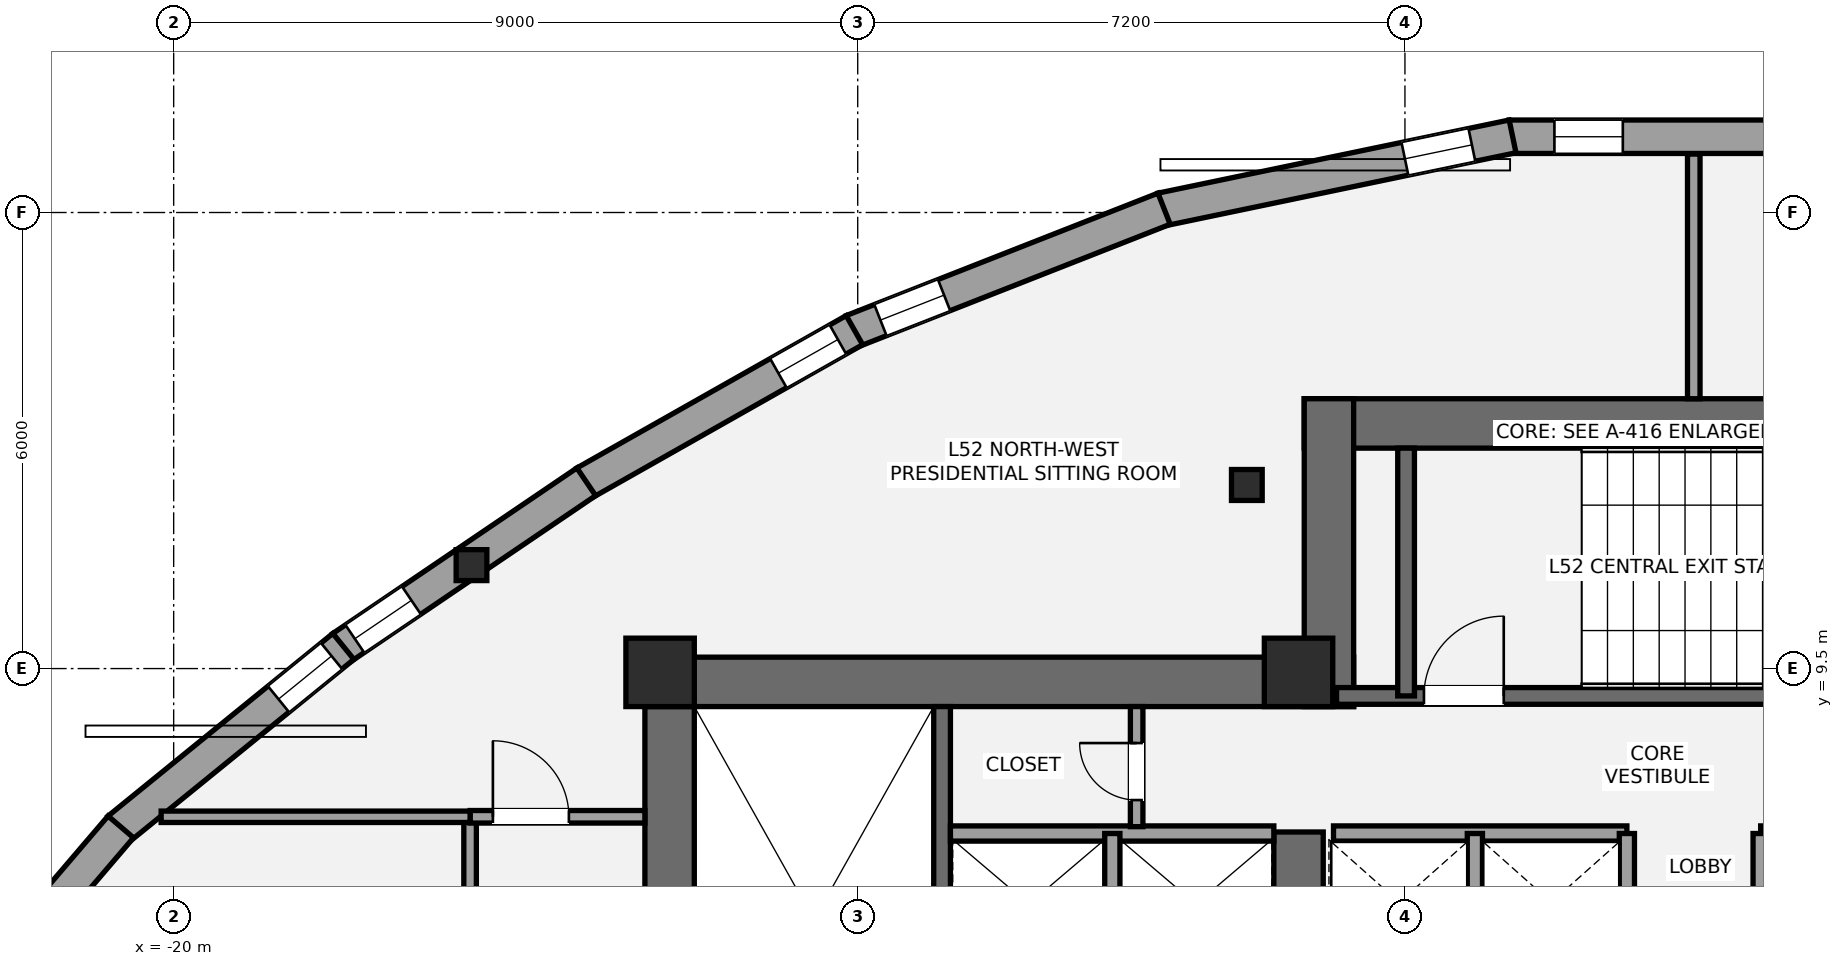
"""IFC4 building model, lengths in metres.
Left out: names, types, materials, properties, quantities, classifications, styles, units other than length and angle.
Written with IfcOpenShell. Run it as: python <this file> out.ifc"""

import sys

from ifc_helpers import new_model, si_unit, direction, frame, frame_2d, origin, origin_2d, place, context, subcontext, project, spatial, rectangle, i_section, extrude, element, fill, save


model = new_model("IFC4")
c1 = context("Model", 3, precision=1e-05, world=origin(), true_north=direction((0.0, 1.0)))
c2 = subcontext(c1, "Body", "Model", "MODEL_VIEW")
j1 = project(units=[si_unit("LENGTHUNIT", "METRE"), si_unit("PLANEANGLEUNIT", "RADIAN")], contexts=[c1])
p1 = place(None, origin())
s1 = spatial("IfcSite", under=j1, at=p1, CompositionType="ELEMENT")
p2 = place(p1, origin())
s2 = spatial("IfcBuilding", under=s1, at=p2, CompositionType="ELEMENT")
p3 = place(p2, frame((0.0, 0.0, 188.6)))
s3 = spatial("IfcBuildingStorey", under=s2, at=p3, CompositionType="ELEMENT", Elevation=188.6)
p4 = place(p3, frame((-13.475, 1.2, 0.0), z_axis=(0.0, 0.0, 1.0), x_axis=(0.0, 1.0, 0.0)))
e1 = element("IfcWall", 1, at=p4, inside=s3, PredefinedType="SHEAR", context=c2, shape_type="SweptSolid", body=[
    extrude(rectangle(XDim=8.45, YDim=0.65, at=frame_2d((4.225, 0.0))), origin(), (0.0, 0.0, 1.0), 3.2),
])
p5 = place(p3, frame((-13.8, 9.325, 0.0), z_axis=(0.0, 0.0, 1.0), x_axis=(1.0, 0.0, 0.0)))
e2 = element("IfcWall", 2, at=p5, inside=s3, PredefinedType="SHEAR", context=c2, shape_type="SweptSolid", body=[
    extrude(rectangle(XDim=9.325, YDim=0.65, at=frame_2d((4.663, 0.0))), origin(), (0.0, 0.0, 1.0), 3.2),
])
p6 = place(p3, frame((-5.2, 5.35, 0.0), z_axis=(0.0, 0.0, 1.0), x_axis=(0.0, 1.0, 0.0)))
e3 = element("IfcWall", 3, at=p6, inside=s3, PredefinedType="SHEAR", context=c2, shape_type="SweptSolid", body=[
    extrude(rectangle(XDim=2.0, YDim=0.65, at=frame_2d((1.0, 0.0))), origin(), (0.0, 0.0, 1.0), 3.2),
])
p7 = place(p3, frame((-9.89, 1.85, 0.0), z_axis=(0.0, 0.0, 1.0), x_axis=(0.0, 1.0, 0.0)))
e4 = element("IfcWall", 4, at=p7, inside=s3, PredefinedType="SHEAR", context=c2, shape_type="SweptSolid", body=[
    extrude(rectangle(XDim=7.15, YDim=0.22, at=frame_2d((3.575, 0.0))), origin(), (0.0, 0.0, 1.0), 3.2),
])
p8 = place(p3, frame((-5.125, 12.725, 0.0), z_axis=(0.0, 0.0, 1.0), x_axis=(1.0, 0.0, 0.0)))
e5 = element("IfcWall", 5, at=p8, inside=s3, PredefinedType="SHEAR", context=c2, shape_type="SweptSolid", body=[
    extrude(rectangle(XDim=10.25, YDim=0.65, at=frame_2d((5.125, 0.0))), origin(), (0.0, 0.0, 1.0), 3.2),
])
p9 = place(p3, frame((-4.8, 9.0, 0.0), z_axis=(0.0, 0.0, 1.0), x_axis=(0.0, 1.0, 0.0)))
e6 = element("IfcWall", 6, at=p9, inside=s3, PredefinedType="SHEAR", context=c2, shape_type="SweptSolid", body=[
    extrude(rectangle(XDim=4.05, YDim=0.65, at=frame_2d((2.025, 0.0))), origin(), (0.0, 0.0, 1.0), 3.2),
])
p10 = place(p3, frame((-4.7, 9.14, 0.0), z_axis=(0.0, 0.0, 1.0), x_axis=(1.0, 0.0, 0.0)))
e7 = element("IfcWall", 7, at=p10, inside=s3, PredefinedType="SHEAR", context=c2, shape_type="SweptSolid", body=[
    extrude(rectangle(XDim=9.3, YDim=0.22, at=frame_2d((4.65, 0.0))), origin(), (0.0, 0.0, 1.0), 3.2),
])
p11 = place(p10, frame((1.15, 0.0, 0.0)))
e8 = element("IfcOpeningElement", 8, at=p11, cuts=e7, PredefinedType="OPENING", context=c2, shape_type="SweptSolid", body=[
    extrude(rectangle(XDim=1.05, YDim=2.15, at=frame_2d((0.525, 1.075))), frame((0.0, 0.12, 0.0), z_axis=(0.0, -1.0, 0.0), x_axis=(1.0, 0.0, 0.0)), (0.0, 0.0, 1.0), 0.24),
])
p12 = place(p3, frame((-3.785, 9.14, 0.0), z_axis=(0.0, 0.0, 1.0), x_axis=(0.0, 1.0, 0.0)))
e9 = element("IfcWall", 9, at=p12, inside=s3, PredefinedType="SHEAR", context=c2, shape_type="SweptSolid", body=[
    extrude(rectangle(XDim=3.26, YDim=0.22, at=frame_2d((1.63, 0.0))), origin(), (0.0, 0.0, 1.0), 3.2),
])
for number, where, z_axis, x_axis in (
    (10, (-13.6, 9.45, 0.0), (0.0, 0.0, 1.0), (1.0, 0.0, 0.0)),
    (11, (-5.2, 9.45, 0.0), (0.0, 0.0, 1.0), (1.0, 0.0, 0.0)),
):
    element("IfcColumn", number, at=place(p3, frame(where, z_axis=z_axis, x_axis=x_axis)), inside=s3, PredefinedType="COLUMN", context=c2, shape_type="SweptSolid", body=[
        extrude(rectangle(XDim=0.9, YDim=0.9, at=origin_2d()), origin(), (0.0, 0.0, 1.0), 3.2),
    ])
for number, where, z_axis, x_axis in (
    (12, (-5.88, 11.915, 0.0), (0.0, 0.0, 1.0), (1.0, 0.0, 0.0)),
    (13, (-16.082, 10.861, 0.0), (0.0, 0.0, 1.0), (1.0, 0.0, 0.0)),
):
    element("IfcColumn", number, at=place(p3, frame(where, z_axis=z_axis, x_axis=x_axis)), inside=s3, PredefinedType="COLUMN", context=c2, shape_type="SweptSolid", body=[
        extrude(i_section(OverallWidth=0.404, OverallDepth=0.407, WebThickness=0.027, FlangeThickness=0.044, at=origin_2d()), origin(), (0.0, 0.0, 1.0), 3.2),
    ])
p13 = place(p3, frame((-2.429, 16.497, 0.0), z_axis=(0.0, 0.0, 1.0), x_axis=(1.0, 0.0, 0.0)))
e14 = element("IfcWall", 14, at=p13, inside=s3, PredefinedType="STANDARD", context=c2, shape_type="SweptSolid", body=[
    extrude(rectangle(XDim=4.857, YDim=0.44, at=frame_2d((2.429, 0.0))), origin(), (0.0, 0.0, 1.0), 2.315),
])
p14 = place(p13, frame((0.595, 0.0, 0.58)))
e15 = element("IfcOpeningElement", 15, at=p14, cuts=e14, PredefinedType="OPENING", context=c2, shape_type="SweptSolid", body=[
    extrude(rectangle(XDim=0.9, YDim=1.35, at=frame_2d((0.45, 0.675))), frame((0.0, 0.23, 0.0), z_axis=(0.0, -1.0, 0.0), x_axis=(1.0, 0.0, 0.0)), (0.0, 0.0, 1.0), 0.46),
])
p15 = place(p3, frame((-7.005, 15.539, 0.0), z_axis=(0.0, 0.0, 1.0), x_axis=(0.979004509935, 0.203838586943, 0.0)))
e16 = element("IfcWall", 16, at=p15, inside=s3, PredefinedType="STANDARD", context=c2, shape_type="SweptSolid", body=[
    extrude(rectangle(XDim=4.72, YDim=0.44, at=frame_2d((2.36, 0.0))), origin(), (0.0, 0.0, 1.0), 2.315),
])
p16 = place(p15, frame((3.273, 0.0, 0.58)))
e17 = element("IfcOpeningElement", 17, at=p16, cuts=e16, PredefinedType="OPENING", context=c2, shape_type="SweptSolid", body=[
    extrude(rectangle(XDim=0.9, YDim=1.35, at=frame_2d((0.45, 0.675))), frame((0.0, 0.23, 0.0), z_axis=(0.0, -1.0, 0.0), x_axis=(1.0, 0.0, 0.0)), (0.0, 0.0, 1.0), 0.46),
])
p17 = place(p3, frame((-11.071, 13.939, 0.0), z_axis=(0.0, 0.0, 1.0), x_axis=(0.930777752543, 0.365585524018, 0.0)))
e18 = element("IfcWall", 18, at=p17, inside=s3, PredefinedType="STANDARD", context=c2, shape_type="SweptSolid", body=[
    extrude(rectangle(XDim=4.407, YDim=0.44, at=frame_2d((2.203, 0.0))), origin(), (0.0, 0.0, 1.0), 2.315),
])
p18 = place(p17, frame((0.397, 0.0, 0.58)))
e19 = element("IfcOpeningElement", 19, at=p18, cuts=e18, PredefinedType="OPENING", context=c2, shape_type="SweptSolid", body=[
    extrude(rectangle(XDim=0.9, YDim=1.35, at=frame_2d((0.45, 0.675))), frame((0.0, 0.23, 0.0), z_axis=(0.0, -1.0, 0.0), x_axis=(1.0, 0.0, 0.0)), (0.0, 0.0, 1.0), 0.46),
])
p19 = place(p3, frame((-14.587, 11.948, 0.0), z_axis=(0.0, 0.0, 1.0), x_axis=(0.870346086449, 0.492440544434, 0.0)))
e20 = element("IfcWall", 20, at=p19, inside=s3, PredefinedType="STANDARD", context=c2, shape_type="SweptSolid", body=[
    extrude(rectangle(XDim=4.071, YDim=0.44, at=frame_2d((2.036, 0.0))), origin(), (0.0, 0.0, 1.0), 2.315),
])
p20 = place(p19, frame((2.922, 0.0, 0.58)))
e21 = element("IfcOpeningElement", 21, at=p20, cuts=e20, PredefinedType="OPENING", context=c2, shape_type="SweptSolid", body=[
    extrude(rectangle(XDim=0.9, YDim=1.35, at=frame_2d((0.45, 0.675))), frame((0.0, 0.23, 0.0), z_axis=(0.0, -1.0, 0.0), x_axis=(1.0, 0.0, 0.0)), (0.0, 0.0, 1.0), 0.46),
])
p21 = place(p3, frame((-17.782, 9.78, 0.0), z_axis=(0.0, 0.0, 1.0), x_axis=(0.82772633423, 0.56113199483, 0.0)))
e22 = element("IfcWall", 22, at=p21, inside=s3, PredefinedType="STANDARD", context=c2, shape_type="SweptSolid", body=[
    extrude(rectangle(XDim=3.879, YDim=0.44, at=frame_2d((1.939, 0.0))), origin(), (0.0, 0.0, 1.0), 2.315),
])
p22 = place(p21, frame((0.2, 0.0, 0.58)))
e23 = element("IfcOpeningElement", 23, at=p22, cuts=e22, PredefinedType="OPENING", context=c2, shape_type="SweptSolid", body=[
    extrude(rectangle(XDim=0.9, YDim=1.35, at=frame_2d((0.45, 0.675))), frame((0.0, 0.23, 0.0), z_axis=(0.0, -1.0, 0.0), x_axis=(1.0, 0.0, 0.0)), (0.0, 0.0, 1.0), 0.46),
])
p23 = place(p3, frame((-20.724, 7.389, 0.0), z_axis=(0.0, 0.0, 1.0), x_axis=(0.776145361002, 0.63055402512, 0.0)))
e24 = element("IfcWall", 24, at=p23, inside=s3, PredefinedType="STANDARD", context=c2, shape_type="SweptSolid", body=[
    extrude(rectangle(XDim=3.81, YDim=0.44, at=frame_2d((1.905, 0.0))), origin(), (0.0, 0.0, 1.0), 2.315),
])
p24 = place(p23, frame((2.71, 0.0, 0.42)))
e25 = element("IfcOpeningElement", 25, at=p24, cuts=e24, PredefinedType="OPENING", context=c2, shape_type="SweptSolid", body=[
    extrude(rectangle(XDim=0.9, YDim=1.35, at=frame_2d((0.45, 0.675))), frame((0.0, 0.23, 0.0), z_axis=(0.0, -1.0, 0.0), x_axis=(1.0, 0.0, 0.0)), (0.0, 0.0, 1.0), 0.46),
])
p25 = place(p3, frame((-23.072, 4.636, 0.0), z_axis=(0.0, 0.0, 1.0), x_axis=(0.649641806751, 0.760240437573, 0.0)))
e26 = element("IfcWall", 26, at=p25, inside=s3, PredefinedType="STANDARD", context=c2, shape_type="SweptSolid", body=[
    extrude(rectangle(XDim=3.658, YDim=0.44, at=frame_2d((1.829, 0.0))), origin(), (0.0, 0.0, 1.0), 2.315),
])
p26 = place(p25, frame((0.2, 0.0, 0.42)))
e27 = element("IfcOpeningElement", 27, at=p26, cuts=e26, PredefinedType="OPENING", context=c2, shape_type="SweptSolid", body=[
    extrude(rectangle(XDim=0.9, YDim=1.35, at=frame_2d((0.45, 0.675))), frame((0.0, 0.23, 0.0), z_axis=(0.0, -1.0, 0.0), x_axis=(1.0, 0.0, 0.0)), (0.0, 0.0, 1.0), 0.46),
])
p27 = place(p3, frame((-9.78, 7.33, 0.0), z_axis=(0.0, 0.0, 1.0), x_axis=(1.0, 0.0, 0.0)))
e28 = element("IfcWall", 28, at=p27, inside=s3, PredefinedType="SOLIDWALL", context=c2, shape_type="SweptSolid", body=[
    extrude(rectangle(XDim=4.255, YDim=0.2, at=frame_2d((2.127, 0.0))), origin(), (0.0, 0.0, 1.0), 3.02),
])
p28 = place(p3, frame((-7.65, 5.47, 0.0), z_axis=(0.0, 0.0, 1.0), x_axis=(0.0, 1.0, 0.0)))
e29 = element("IfcWall", 29, at=p28, inside=s3, PredefinedType="SOLIDWALL", context=c2, shape_type="SweptSolid", body=[
    extrude(rectangle(XDim=1.86, YDim=0.2, at=frame_2d((0.93, 0.0))), origin(), (0.0, 0.0, 1.0), 3.02),
])
for number, where, z_axis, x_axis in (
    (30, (-4.74, 7.33, 0.0), (0.0, 0.0, 1.0), (1.0, 0.0, 0.0)),
    (31, (0.88, 7.33, 0.0), (0.0, 0.0, 1.0), (1.0, 0.0, 0.0)),
):
    element("IfcWall", number, at=place(p3, frame(where, z_axis=z_axis, x_axis=x_axis)), inside=s3, PredefinedType="SOLIDWALL", context=c2, shape_type="SweptSolid", body=[
        extrude(rectangle(XDim=3.86, YDim=0.2, at=frame_2d((1.93, 0.0))), origin(), (0.0, 0.0, 1.0), 3.02),
    ])
for number, where, z_axis, x_axis in (
    (32, (-2.88, 5.52, 0.0), (0.0, 0.0, 1.0), (0.0, 1.0, 0.0)),
    (33, (-0.88, 5.52, 0.0), (0.0, 0.0, 1.0), (0.0, 1.0, 0.0)),
    (34, (0.88, 5.52, 0.0), (0.0, 0.0, 1.0), (0.0, 1.0, 0.0)),
):
    element("IfcWall", number, at=place(p3, frame(where, z_axis=z_axis, x_axis=x_axis)), inside=s3, PredefinedType="SOLIDWALL", context=c2, shape_type="SweptSolid", body=[
        extrude(rectangle(XDim=1.81, YDim=0.2, at=frame_2d((0.905, 0.0))), origin(), (0.0, 0.0, 1.0), 3.02),
    ])
p29 = place(p3, frame((-7.33, 7.42, 0.0), z_axis=(0.0, 0.0, 1.0), x_axis=(0.0, 1.0, 0.0)))
e35 = element("IfcWall", 35, at=p29, inside=s3, PredefinedType="PARTITIONING", context=c2, shape_type="SweptSolid", body=[
    extrude(rectangle(XDim=1.58, YDim=0.165, at=frame_2d((0.79, 0.0))), origin(), (0.0, 0.0, 1.0), 3.02),
])
p30 = place(p29, frame((0.35, 0.0, 0.0)))
e36 = element("IfcOpeningElement", 36, at=p30, cuts=e35, PredefinedType="OPENING", context=c2, shape_type="SweptSolid", body=[
    extrude(rectangle(XDim=0.75, YDim=2.1, at=frame_2d((0.375, 1.05))), frame((0.0, 0.093, 0.0), z_axis=(0.0, -1.0, 0.0), x_axis=(1.0, 0.0, 0.0)), (0.0, 0.0, 1.0), 0.185),
])
p31 = place(p3, frame((-16.1, -10.645, 0.0), z_axis=(0.0, 0.0, 1.0), x_axis=(0.0, 1.0, 0.0)))
e37 = element("IfcWall", 37, at=p31, inside=s3, PredefinedType="PARTITIONING", context=c2, shape_type="SweptSolid", body=[
    extrude(rectangle(XDim=18.195, YDim=0.165, at=frame_2d((9.098, 0.0))), origin(), (0.0, 0.0, 1.0), 2.473),
])
p32 = place(p31, frame((3.646, 0.0, 0.0)))
e38 = element("IfcOpeningElement", 38, at=p32, cuts=e37, PredefinedType="OPENING", context=c2, shape_type="SweptSolid", body=[
    extrude(rectangle(XDim=0.85, YDim=2.1, at=frame_2d((0.425, 1.05))), frame((0.0, 0.093, 0.0), z_axis=(0.0, -1.0, 0.0), x_axis=(1.0, 0.0, 0.0)), (0.0, 0.0, 1.0), 0.185),
])
p33 = place(p31, frame((6.821, 0.0, 0.0)))
e39 = element("IfcOpeningElement", 39, at=p33, cuts=e37, PredefinedType="OPENING", context=c2, shape_type="SweptSolid", body=[
    extrude(rectangle(XDim=1.0, YDim=2.15, at=frame_2d((0.5, 1.075))), frame((0.0, 0.093, 0.0), z_axis=(0.0, -1.0, 0.0), x_axis=(1.0, 0.0, 0.0)), (0.0, 0.0, 1.0), 0.185),
])
p34 = place(p31, frame((11.246, 0.0, 0.0)))
e40 = element("IfcOpeningElement", 40, at=p34, cuts=e37, PredefinedType="OPENING", context=c2, shape_type="SweptSolid", body=[
    extrude(rectangle(XDim=1.0, YDim=2.15, at=frame_2d((0.5, 1.075))), frame((0.0, 0.093, 0.0), z_axis=(0.0, -1.0, 0.0), x_axis=(1.0, 0.0, 0.0)), (0.0, 0.0, 1.0), 0.185),
])
p35 = place(p31, frame((15.521, 0.0, 0.0)))
e41 = element("IfcOpeningElement", 41, at=p35, cuts=e37, PredefinedType="OPENING", context=c2, shape_type="SweptSolid", body=[
    extrude(rectangle(XDim=1.0, YDim=2.15, at=frame_2d((0.5, 1.075))), frame((0.0, 0.093, 0.0), z_axis=(0.0, -1.0, 0.0), x_axis=(1.0, 0.0, 0.0)), (0.0, 0.0, 1.0), 0.185),
])
p36 = place(p3, frame((-16.1, 7.55, 0.0), z_axis=(0.0, 0.0, 1.0), x_axis=(1.0, 0.0, 0.0)))
e42 = element("IfcWall", 42, at=p36, inside=s3, PredefinedType="PARTITIONING", context=c2, shape_type="SweptSolid", body=[
    extrude(rectangle(XDim=2.3, YDim=0.165, at=frame_2d((1.15, 0.0))), origin(), (0.0, 0.0, 1.0), 2.473),
])
p37 = place(p36, frame((0.3, 0.0, 0.0)))
e43 = element("IfcOpeningElement", 43, at=p37, cuts=e42, PredefinedType="OPENING", context=c2, shape_type="SweptSolid", body=[
    extrude(rectangle(XDim=1.0, YDim=2.15, at=frame_2d((0.5, 1.075))), frame((0.0, 0.093, 0.0), z_axis=(0.0, -1.0, 0.0), x_axis=(1.0, 0.0, 0.0)), (0.0, 0.0, 1.0), 0.185),
])
p38 = place(p3, frame((-20.165, 7.55, 0.0), z_axis=(0.0, 0.0, 1.0), x_axis=(1.0, 0.0, 0.0)))
e44 = element("IfcWall", 44, at=p38, inside=s3, PredefinedType="PLUMBINGWALL", context=c2, shape_type="SweptSolid", body=[
    extrude(rectangle(XDim=4.065, YDim=0.15, at=frame_2d((2.032, 0.0))), origin(), (0.0, 0.0, 1.0), 2.473),
])
p39 = place(p3, frame((0.0, 13.05, 0.0), z_axis=(0.0, 0.0, 1.0), x_axis=(0.0, 1.0, 0.0)))
e45 = element("IfcWall", 45, at=p39, inside=s3, PredefinedType="PARTITIONING", context=c2, shape_type="SweptSolid", body=[
    extrude(rectangle(XDim=3.219, YDim=0.165, at=frame_2d((1.609, 0.0))), origin(), (0.0, 0.0, 1.0), 3.02),
])
p40 = place(p14, origin())
e46 = element("IfcWindow", 46, at=p40, inside=s3, PartitioningType="SINGLE_PANEL", PredefinedType="WINDOW", context=c2, shape_type="SweptSolid", body=[
    extrude(rectangle(XDim=0.9, YDim=1.35, at=frame_2d((0.45, 0.675))), frame((0.0, -0.01, 0.0), z_axis=(0.0, -1.0, 0.0), x_axis=(1.0, 0.0, 0.0)), (0.0, 0.0, 1.0), 0.06),
])
fill(e15, e46)
p41 = place(p16, origin())
e47 = element("IfcWindow", 47, at=p41, inside=s3, PartitioningType="SINGLE_PANEL", PredefinedType="WINDOW", context=c2, shape_type="SweptSolid", body=[
    extrude(rectangle(XDim=0.9, YDim=1.35, at=frame_2d((0.45, 0.675))), frame((0.0, -0.01, 0.0), z_axis=(0.0, -1.0, 0.0), x_axis=(1.0, 0.0, 0.0)), (0.0, 0.0, 1.0), 0.06),
])
fill(e17, e47)
p42 = place(p18, origin())
e48 = element("IfcWindow", 48, at=p42, inside=s3, PartitioningType="SINGLE_PANEL", PredefinedType="WINDOW", context=c2, shape_type="SweptSolid", body=[
    extrude(rectangle(XDim=0.9, YDim=1.35, at=frame_2d((0.45, 0.675))), frame((0.0, -0.01, 0.0), z_axis=(0.0, -1.0, 0.0), x_axis=(1.0, 0.0, 0.0)), (0.0, 0.0, 1.0), 0.06),
])
fill(e19, e48)
p43 = place(p20, origin())
e49 = element("IfcWindow", 49, at=p43, inside=s3, PartitioningType="SINGLE_PANEL", PredefinedType="WINDOW", context=c2, shape_type="SweptSolid", body=[
    extrude(rectangle(XDim=0.9, YDim=1.35, at=frame_2d((0.45, 0.675))), frame((0.0, -0.01, 0.0), z_axis=(0.0, -1.0, 0.0), x_axis=(1.0, 0.0, 0.0)), (0.0, 0.0, 1.0), 0.06),
])
fill(e21, e49)
p44 = place(p22, origin())
e50 = element("IfcWindow", 50, at=p44, inside=s3, PartitioningType="SINGLE_PANEL", PredefinedType="WINDOW", context=c2, shape_type="SweptSolid", body=[
    extrude(rectangle(XDim=0.9, YDim=1.35, at=frame_2d((0.45, 0.675))), frame((0.0, -0.01, 0.0), z_axis=(0.0, -1.0, 0.0), x_axis=(1.0, 0.0, 0.0)), (0.0, 0.0, 1.0), 0.06),
])
fill(e23, e50)
p45 = place(p24, origin())
e51 = element("IfcWindow", 51, at=p45, inside=s3, PartitioningType="SINGLE_PANEL", PredefinedType="WINDOW", context=c2, shape_type="SweptSolid", body=[
    extrude(rectangle(XDim=0.9, YDim=1.35, at=frame_2d((0.45, 0.675))), frame((0.0, -0.01, 0.0), z_axis=(0.0, -1.0, 0.0), x_axis=(1.0, 0.0, 0.0)), (0.0, 0.0, 1.0), 0.06),
])
fill(e25, e51)
p46 = place(p11, origin())
e52 = element("IfcDoor", 52, at=p46, inside=s3, OperationType="SINGLE_SWING_RIGHT", PredefinedType="DOOR", context=c2, shape_type="SweptSolid", body=[
    extrude(rectangle(XDim=1.05, YDim=2.15, at=frame_2d((0.525, 1.075))), frame((0.0, 0.025, 0.0), z_axis=(0.0, -1.0, 0.0), x_axis=(1.0, 0.0, 0.0)), (0.0, 0.0, 1.0), 0.05),
])
fill(e8, e52)
p47 = place(p30, origin())
e53 = element("IfcDoor", 53, at=p47, inside=s3, OperationType="SINGLE_SWING_RIGHT", PredefinedType="DOOR", context=c2, shape_type="SweptSolid", body=[
    extrude(rectangle(XDim=0.75, YDim=2.1, at=frame_2d((0.375, 1.05))), frame((0.0, 0.025, 0.0), z_axis=(0.0, -1.0, 0.0), x_axis=(1.0, 0.0, 0.0)), (0.0, 0.0, 1.0), 0.05),
])
fill(e36, e53)
p48 = place(p37, origin())
e54 = element("IfcDoor", 54, at=p48, inside=s3, OperationType="SINGLE_SWING_LEFT", PredefinedType="DOOR", context=c2, shape_type="SweptSolid", body=[
    extrude(rectangle(XDim=1.0, YDim=2.15, at=frame_2d((0.5, 1.075))), frame((0.0, 0.025, 0.0), z_axis=(0.0, -1.0, 0.0), x_axis=(1.0, 0.0, 0.0)), (0.0, 0.0, 1.0), 0.05),
])
fill(e43, e54)
save(model, sys.argv[1])
